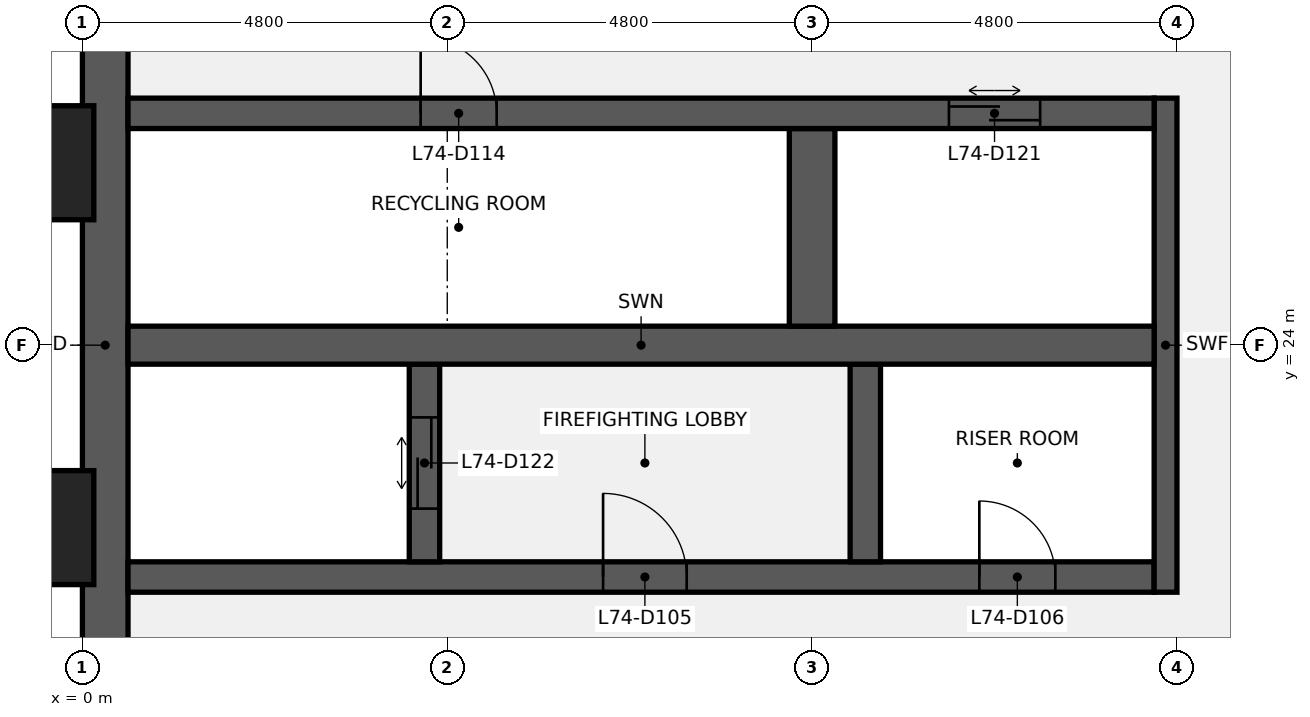
"""IFC4 building model, lengths in metres.
Left out: names, types, materials, properties, quantities, classifications, styles, units other than length and angle.
Written with IfcOpenShell. Run it as: python <this file> out.ifc"""

import sys

from ifc_helpers import new_model, si_unit, direction, frame, frame_2d, origin, origin_2d, place, context, subcontext, project, spatial, rectangle, extrude, element, fill, save


model = new_model("IFC4")
c1 = context("Model", 3, precision=1e-05, world=origin(), true_north=direction((0.0, 1.0)))
c2 = subcontext(c1, "Body", "Model", "MODEL_VIEW")
j1 = project(units=[si_unit("LENGTHUNIT", "METRE"), si_unit("PLANEANGLEUNIT", "RADIAN")], contexts=[c1])
p1 = place(None, origin())
s1 = spatial("IfcSite", under=j1, at=p1, CompositionType="ELEMENT")
p2 = place(p1, origin())
s2 = spatial("IfcBuilding", under=s1, at=p2, CompositionType="ELEMENT")
p3 = place(p2, frame((0.0, 0.0, 334.3)))
s3 = spatial("IfcBuildingStorey", under=s2, at=p3, CompositionType="ELEMENT", Elevation=334.3)
p4 = place(p3, frame((0.3, 9.6, 0.0), z_axis=(0.0, 0.0, 1.0), x_axis=(0.0, 1.0, 0.0)))
e1 = element("IfcWall", 1, at=p4, inside=s3, PredefinedType="SHEAR", context=c2, shape_type="SweptSolid", body=[
    extrude(rectangle(XDim=28.8, YDim=0.6, at=frame_2d((14.4, 0.0))), origin(), (0.0, 0.0, 1.0), 3.84),
])
p5 = place(p4, frame((8.85, 0.0, 0.9)))
e2 = element("IfcOpeningElement", 2, at=p5, cuts=e1, PredefinedType="OPENING", context=c2, shape_type="SweptSolid", body=[
    extrude(rectangle(XDim=1.5, YDim=1.5, at=frame_2d((0.75, 0.75))), frame((0.0, 0.31, 0.0), z_axis=(0.0, -1.0, 0.0), x_axis=(1.0, 0.0, 0.0)), (0.0, 0.0, 1.0), 0.62),
])
p6 = place(p4, frame((18.45, 0.0, 0.9)))
e3 = element("IfcOpeningElement", 3, at=p6, cuts=e1, PredefinedType="OPENING", context=c2, shape_type="SweptSolid", body=[
    extrude(rectangle(XDim=1.5, YDim=1.5, at=frame_2d((0.75, 0.75))), frame((0.0, 0.31, 0.0), z_axis=(0.0, -1.0, 0.0), x_axis=(1.0, 0.0, 0.0)), (0.0, 0.0, 1.0), 0.62),
])
p7 = place(p3, frame((0.6, 20.95, 0.0), z_axis=(0.0, 0.0, 1.0), x_axis=(1.0, 0.0, 0.0)))
e4 = element("IfcWall", 4, at=p7, inside=s3, PredefinedType="SHEAR", context=c2, shape_type="SweptSolid", body=[
    extrude(rectangle(XDim=13.5, YDim=0.4, at=frame_2d((6.75, 0.0))), origin(), (0.0, 0.0, 1.0), 3.84),
])
p8 = place(p7, frame((6.25, 0.0, 0.0)))
e5 = element("IfcOpeningElement", 5, at=p8, cuts=e4, PredefinedType="OPENING", context=c2, shape_type="SweptSolid", body=[
    extrude(rectangle(XDim=1.1, YDim=2.1, at=frame_2d((0.55, 1.05))), frame((0.0, 0.21, 0.0), z_axis=(0.0, -1.0, 0.0), x_axis=(1.0, 0.0, 0.0)), (0.0, 0.0, 1.0), 0.42),
])
p9 = place(p7, frame((11.2, 0.0, 0.0)))
e6 = element("IfcOpeningElement", 6, at=p9, cuts=e4, PredefinedType="OPENING", context=c2, shape_type="SweptSolid", body=[
    extrude(rectangle(XDim=1.0, YDim=2.1, at=frame_2d((0.5, 1.05))), frame((0.0, 0.21, 0.0), z_axis=(0.0, -1.0, 0.0), x_axis=(1.0, 0.0, 0.0)), (0.0, 0.0, 1.0), 0.42),
])
p10 = place(p3, frame((14.25, 20.75, 0.0), z_axis=(0.0, 0.0, 1.0), x_axis=(0.0, 1.0, 0.0)))
e7 = element("IfcWall", 7, at=p10, inside=s3, PredefinedType="SHEAR", context=c2, shape_type="SweptSolid", body=[
    extrude(rectangle(XDim=6.5, YDim=0.3, at=frame_2d((3.25, 0.0))), origin(), (0.0, 0.0, 1.0), 3.84),
])
p11 = place(p3, frame((4.5, 21.15, 0.0), z_axis=(0.0, 0.0, 1.0), x_axis=(0.0, 1.0, 0.0)))
e8 = element("IfcWall", 8, at=p11, inside=s3, PredefinedType="SHEAR", context=c2, shape_type="SweptSolid", body=[
    extrude(rectangle(XDim=2.6, YDim=0.4, at=frame_2d((1.3, 0.0))), origin(), (0.0, 0.0, 1.0), 3.84),
])
p12 = place(p11, frame((0.7, 0.0, 0.0)))
e9 = element("IfcOpeningElement", 9, at=p12, cuts=e8, PredefinedType="OPENING", context=c2, shape_type="SweptSolid", body=[
    extrude(rectangle(XDim=1.2, YDim=2.1, at=frame_2d((0.6, 1.05))), frame((0.0, 0.21, 0.0), z_axis=(0.0, -1.0, 0.0), x_axis=(1.0, 0.0, 0.0)), (0.0, 0.0, 1.0), 0.42),
])
p13 = place(p3, frame((10.3, 21.15, 0.0), z_axis=(0.0, 0.0, 1.0), x_axis=(0.0, 1.0, 0.0)))
e10 = element("IfcWall", 10, at=p13, inside=s3, PredefinedType="SHEAR", context=c2, shape_type="SweptSolid", body=[
    extrude(rectangle(XDim=2.6, YDim=0.4, at=frame_2d((1.3, 0.0))), origin(), (0.0, 0.0, 1.0), 3.84),
])
p14 = place(p3, frame((0.6, 24.0, 0.0), z_axis=(0.0, 0.0, 1.0), x_axis=(1.0, 0.0, 0.0)))
e11 = element("IfcWall", 11, at=p14, inside=s3, PredefinedType="SHEAR", context=c2, shape_type="SweptSolid", body=[
    extrude(rectangle(XDim=13.5, YDim=0.5, at=frame_2d((6.75, 0.0))), origin(), (0.0, 0.0, 1.0), 3.84),
])
p15 = place(p3, frame((9.6, 24.25, 0.0), z_axis=(0.0, 0.0, 1.0), x_axis=(0.0, 1.0, 0.0)))
e12 = element("IfcWall", 12, at=p15, inside=s3, PredefinedType="SHEAR", context=c2, shape_type="SweptSolid", body=[
    extrude(rectangle(XDim=2.6, YDim=0.6, at=frame_2d((1.3, 0.0))), origin(), (0.0, 0.0, 1.0), 3.84),
])
p16 = place(p3, frame((0.6, 27.05, 0.0), z_axis=(0.0, 0.0, 1.0), x_axis=(1.0, 0.0, 0.0)))
e13 = element("IfcWall", 13, at=p16, inside=s3, PredefinedType="SHEAR", context=c2, shape_type="SweptSolid", body=[
    extrude(rectangle(XDim=13.5, YDim=0.4, at=frame_2d((6.75, 0.0))), origin(), (0.0, 0.0, 1.0), 3.84),
])
p17 = place(p16, frame((3.85, 0.0, 0.0)))
e14 = element("IfcOpeningElement", 14, at=p17, cuts=e13, PredefinedType="OPENING", context=c2, shape_type="SweptSolid", body=[
    extrude(rectangle(XDim=1.0, YDim=2.1, at=frame_2d((0.5, 1.05))), frame((0.0, 0.21, 0.0), z_axis=(0.0, -1.0, 0.0), x_axis=(1.0, 0.0, 0.0)), (0.0, 0.0, 1.0), 0.42),
])
p18 = place(p16, frame((10.8, 0.0, 0.0)))
e15 = element("IfcOpeningElement", 15, at=p18, cuts=e13, PredefinedType="OPENING", context=c2, shape_type="SweptSolid", body=[
    extrude(rectangle(XDim=1.2, YDim=2.1, at=frame_2d((0.6, 1.05))), frame((0.0, 0.21, 0.0), z_axis=(0.0, -1.0, 0.0), x_axis=(1.0, 0.0, 0.0)), (0.0, 0.0, 1.0), 0.42),
])
for number, where, z_axis, x_axis in (
    (16, (-0.75, 21.6, 0.0), (0.0, 0.0, 1.0), (0.0, 1.0, 0.0)),
    (17, (-0.75, 26.4, 0.0), (0.0, 0.0, 1.0), (0.0, 1.0, 0.0)),
):
    element("IfcColumn", number, at=place(p3, frame(where, z_axis=z_axis, x_axis=x_axis)), inside=s3, PredefinedType="PILASTER", context=c2, shape_type="SweptSolid", body=[
        extrude(rectangle(XDim=1.8, YDim=1.5, at=origin_2d()), origin(), (0.0, 0.0, 1.0), 4.0),
    ])
p19 = place(p8, origin())
e18 = element("IfcDoor", 18, at=p19, inside=s3, OperationType="SINGLE_SWING_LEFT", PredefinedType="DOOR", context=c2, shape_type="SweptSolid", body=[
    extrude(rectangle(XDim=1.1, YDim=2.1, at=frame_2d((0.55, 1.05))), frame((0.0, 0.025, 0.0), z_axis=(0.0, -1.0, 0.0), x_axis=(1.0, 0.0, 0.0)), (0.0, 0.0, 1.0), 0.05),
])
fill(e5, e18)
p20 = place(p9, origin())
e19 = element("IfcDoor", 19, at=p20, inside=s3, OperationType="SINGLE_SWING_LEFT", PredefinedType="DOOR", context=c2, shape_type="SweptSolid", body=[
    extrude(rectangle(XDim=1.0, YDim=2.1, at=frame_2d((0.5, 1.05))), frame((0.0, 0.025, 0.0), z_axis=(0.0, -1.0, 0.0), x_axis=(1.0, 0.0, 0.0)), (0.0, 0.0, 1.0), 0.05),
])
fill(e6, e19)
p21 = place(p17, origin())
e20 = element("IfcDoor", 20, at=p21, inside=s3, OperationType="SINGLE_SWING_LEFT", PredefinedType="DOOR", context=c2, shape_type="SweptSolid", body=[
    extrude(rectangle(XDim=1.0, YDim=2.1, at=frame_2d((0.5, 1.05))), frame((0.0, 0.025, 0.0), z_axis=(0.0, -1.0, 0.0), x_axis=(1.0, 0.0, 0.0)), (0.0, 0.0, 1.0), 0.05),
])
fill(e14, e20)
p22 = place(p18, origin())
e21 = element("IfcDoor", 21, at=p22, inside=s3, OperationType="DOUBLE_DOOR_SLIDING", PredefinedType="DOOR", context=c2, shape_type="SweptSolid", body=[
    extrude(rectangle(XDim=1.2, YDim=2.1, at=frame_2d((0.6, 1.05))), frame((0.0, 0.025, 0.0), z_axis=(0.0, -1.0, 0.0), x_axis=(1.0, 0.0, 0.0)), (0.0, 0.0, 1.0), 0.05),
])
fill(e15, e21)
p23 = place(p12, origin())
e22 = element("IfcDoor", 22, at=p23, inside=s3, OperationType="DOUBLE_DOOR_SLIDING", PredefinedType="DOOR", context=c2, shape_type="SweptSolid", body=[
    extrude(rectangle(XDim=1.2, YDim=2.1, at=frame_2d((0.6, 1.05))), frame((0.0, 0.025, 0.0), z_axis=(0.0, -1.0, 0.0), x_axis=(1.0, 0.0, 0.0)), (0.0, 0.0, 1.0), 0.05),
])
fill(e9, e22)
save(model, sys.argv[1])
